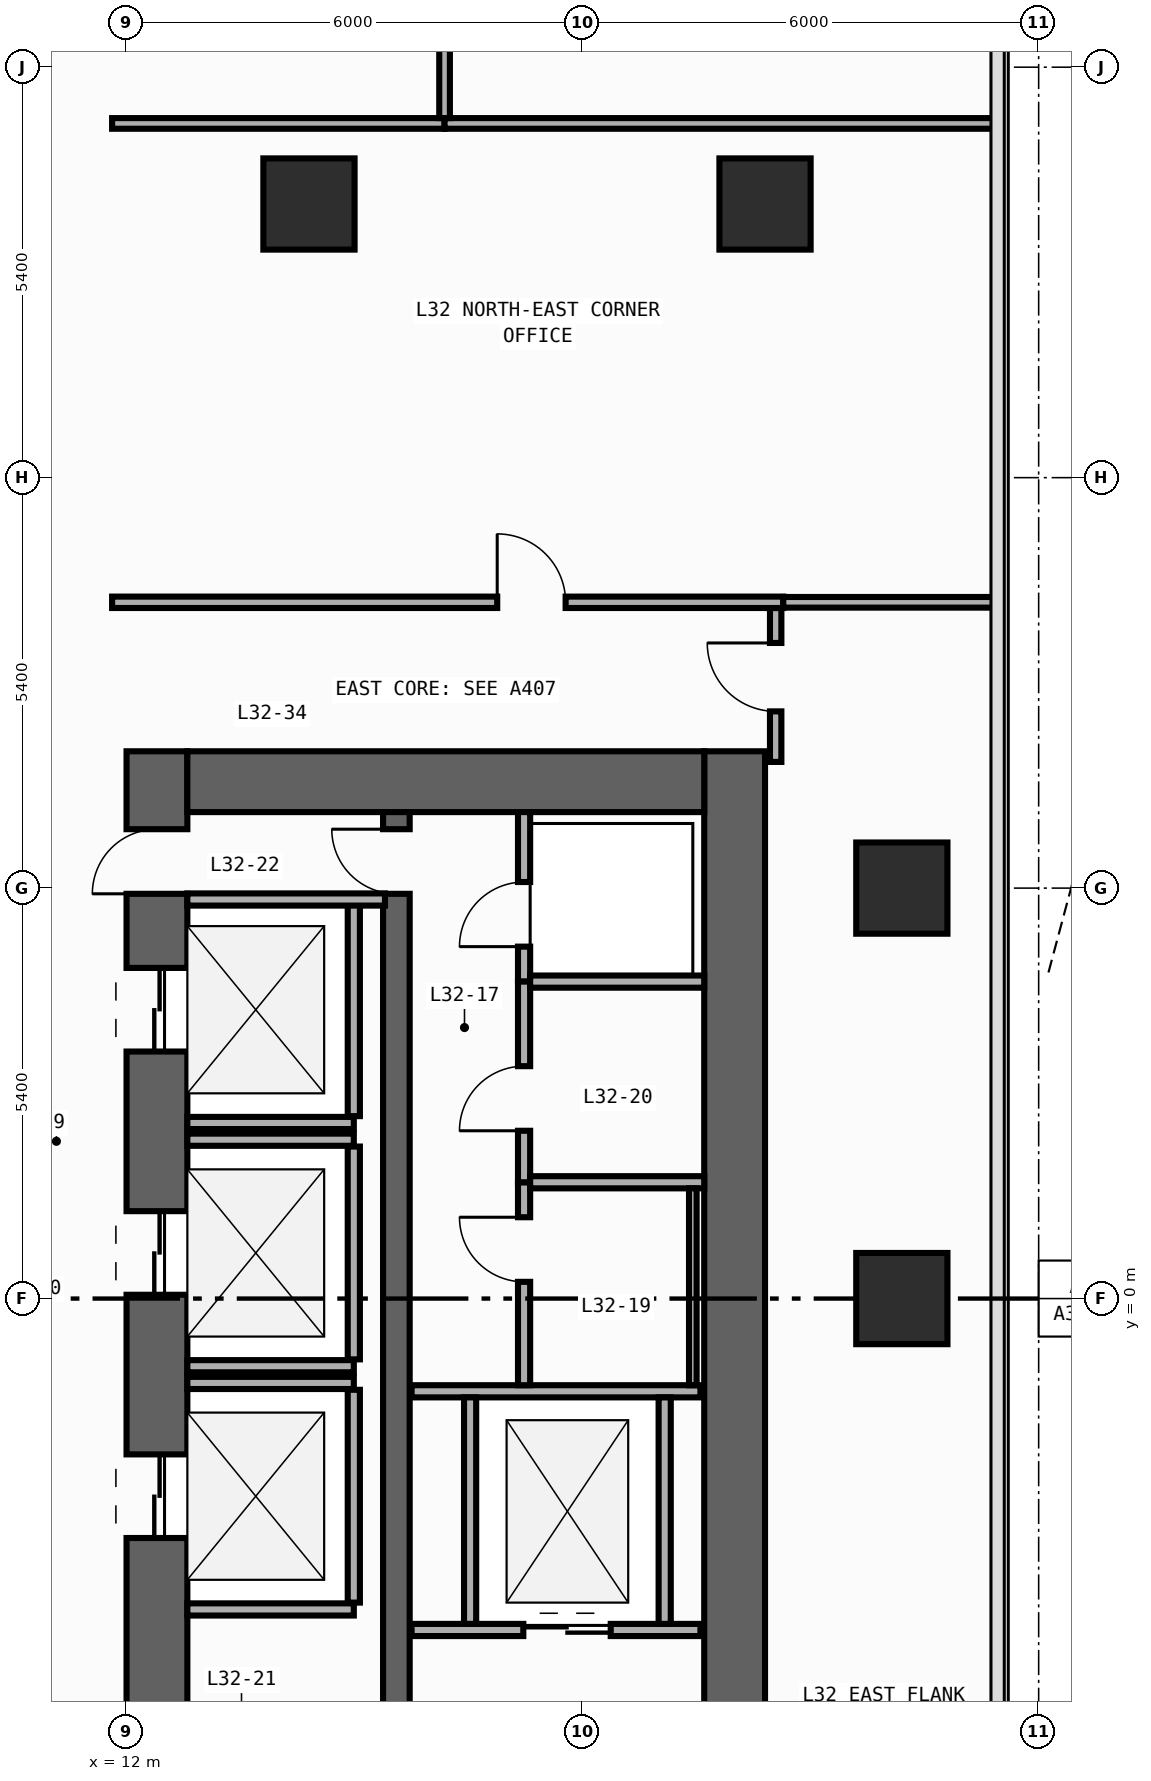
"""IFC4 building model, lengths in metres.
Left out: names, types, materials, properties, quantities, classifications, styles, units other than length and angle.
Written with IfcOpenShell. Run it as: python <this file> out.ifc"""

import sys

from ifc_helpers import new_model, si_unit, direction, frame, frame_2d, origin, origin_2d, place, context, subcontext, project, spatial, rectangle, extrude, element, fill, save


model = new_model("IFC4")
c1 = context("Model", 3, precision=1e-05, world=origin(), true_north=direction((0.0, 1.0)))
c2 = subcontext(c1, "Body", "Model", "MODEL_VIEW")
j1 = project(units=[si_unit("LENGTHUNIT", "METRE"), si_unit("PLANEANGLEUNIT", "RADIAN")], contexts=[c1])
p1 = place(None, origin())
s1 = spatial("IfcSite", under=j1, at=p1, CompositionType="ELEMENT")
p2 = place(p1, origin())
s2 = spatial("IfcBuilding", under=s1, at=p2, CompositionType="ELEMENT")
p3 = place(p2, frame((0.0, 0.0, 139.4)))
s3 = spatial("IfcBuildingStorey", under=s2, at=p3, CompositionType="ELEMENT", Elevation=139.4)
p4 = place(p3, frame((12.4, -19.8, 0.0), z_axis=(0.0, 0.0, 1.0), x_axis=(0.0, 1.0, 0.0)))
e1 = element("IfcWall", 1, at=p4, inside=s3, PredefinedType="SHEAR", context=c2, shape_type="SweptSolid", body=[
    extrude(rectangle(XDim=27.0, YDim=0.8, at=frame_2d((13.5, 0.0))), origin(), (0.0, 0.0, 1.0), 3.94),
])
p5 = place(p4, frame((23.05, 0.0, 0.0)))
e2 = element("IfcOpeningElement", 2, at=p5, cuts=e1, PredefinedType="OPENING", context=c2, shape_type="SweptSolid", body=[
    extrude(rectangle(XDim=1.1, YDim=2.2, at=frame_2d((0.55, 1.1))), frame((0.0, 0.41, 0.0), z_axis=(0.0, -1.0, 0.0), x_axis=(1.0, 0.0, 0.0)), (0.0, 0.0, 1.0), 0.82),
])
p6 = place(p4, frame((19.85, 0.0, 0.0)))
e3 = element("IfcOpeningElement", 3, at=p6, cuts=e1, PredefinedType="OPENING", context=c2, shape_type="SweptSolid", body=[
    extrude(rectangle(XDim=1.1, YDim=2.2, at=frame_2d((0.55, 1.1))), frame((0.0, 0.41, 0.0), z_axis=(0.0, -1.0, 0.0), x_axis=(1.0, 0.0, 0.0)), (0.0, 0.0, 1.0), 0.82),
])
p7 = place(p4, frame((16.65, 0.0, 0.0)))
e4 = element("IfcOpeningElement", 4, at=p7, cuts=e1, PredefinedType="OPENING", context=c2, shape_type="SweptSolid", body=[
    extrude(rectangle(XDim=1.1, YDim=2.2, at=frame_2d((0.55, 1.1))), frame((0.0, 0.41, 0.0), z_axis=(0.0, -1.0, 0.0), x_axis=(1.0, 0.0, 0.0)), (0.0, 0.0, 1.0), 0.82),
])
p8 = place(p4, frame((7.175, 0.0, 0.0)))
e5 = element("IfcOpeningElement", 5, at=p8, cuts=e1, PredefinedType="OPENING", context=c2, shape_type="SweptSolid", body=[
    extrude(rectangle(XDim=0.85, YDim=2.1, at=frame_2d((0.425, 1.05))), frame((0.0, 0.41, 0.0), z_axis=(0.0, -1.0, 0.0), x_axis=(1.0, 0.0, 0.0)), (0.0, 0.0, 1.0), 0.82),
])
p9 = place(p4, frame((10.375, 0.0, 0.0)))
e6 = element("IfcOpeningElement", 6, at=p9, cuts=e1, PredefinedType="OPENING", context=c2, shape_type="SweptSolid", body=[
    extrude(rectangle(XDim=0.85, YDim=2.1, at=frame_2d((0.425, 1.05))), frame((0.0, 0.41, 0.0), z_axis=(0.0, -1.0, 0.0), x_axis=(1.0, 0.0, 0.0)), (0.0, 0.0, 1.0), 0.82),
])
p10 = place(p4, frame((12.725, 0.0, 0.0)))
e7 = element("IfcOpeningElement", 7, at=p10, cuts=e1, PredefinedType="OPENING", context=c2, shape_type="SweptSolid", body=[
    extrude(rectangle(XDim=1.15, YDim=2.2, at=frame_2d((0.575, 1.1))), frame((0.0, 0.41, 0.0), z_axis=(0.0, -1.0, 0.0), x_axis=(1.0, 0.0, 0.0)), (0.0, 0.0, 1.0), 0.82),
])
p11 = place(p4, frame((25.125, 0.0, 0.0)))
e8 = element("IfcOpeningElement", 8, at=p11, cuts=e1, PredefinedType="OPENING", context=c2, shape_type="SweptSolid", body=[
    extrude(rectangle(XDim=0.85, YDim=2.1, at=frame_2d((0.425, 1.05))), frame((0.0, 0.41, 0.0), z_axis=(0.0, -1.0, 0.0), x_axis=(1.0, 0.0, 0.0)), (0.0, 0.0, 1.0), 0.82),
])
p12 = place(p3, frame((20.0, -19.8, 0.0), z_axis=(0.0, 0.0, 1.0), x_axis=(0.0, 1.0, 0.0)))
e9 = element("IfcWall", 9, at=p12, inside=s3, PredefinedType="SHEAR", context=c2, shape_type="SweptSolid", body=[
    extrude(rectangle(XDim=27.0, YDim=0.8, at=frame_2d((13.5, 0.0))), origin(), (0.0, 0.0, 1.0), 3.94),
])
p13 = place(p3, frame((12.8, 6.8, 0.0), z_axis=(0.0, 0.0, 1.0), x_axis=(1.0, 0.0, 0.0)))
e10 = element("IfcWall", 10, at=p13, inside=s3, PredefinedType="SHEAR", context=c2, shape_type="SweptSolid", body=[
    extrude(rectangle(XDim=6.8, YDim=0.8, at=frame_2d((3.4, 0.0))), origin(), (0.0, 0.0, 1.0), 3.94),
])
p14 = place(p3, frame((15.55, -19.0, 0.0), z_axis=(0.0, 0.0, 1.0), x_axis=(0.0, 1.0, 0.0)))
e11 = element("IfcWall", 11, at=p14, inside=s3, PredefinedType="SHEAR", context=c2, shape_type="SweptSolid", body=[
    extrude(rectangle(XDim=25.4, YDim=0.35, at=frame_2d((12.7, 0.0))), origin(), (0.0, 0.0, 1.0), 3.94),
])
p15 = place(p14, frame((11.925, 0.0, 0.0)))
e12 = element("IfcOpeningElement", 12, at=p15, cuts=e11, PredefinedType="OPENING", context=c2, shape_type="SweptSolid", body=[
    extrude(rectangle(XDim=1.15, YDim=2.2, at=frame_2d((0.575, 1.1))), frame((0.0, 0.185, 0.0), z_axis=(0.0, -1.0, 0.0), x_axis=(1.0, 0.0, 0.0)), (0.0, 0.0, 1.0), 0.37),
])
p16 = place(p14, frame((24.325, 0.0, 0.0)))
e13 = element("IfcOpeningElement", 13, at=p16, cuts=e11, PredefinedType="OPENING", context=c2, shape_type="SweptSolid", body=[
    extrude(rectangle(XDim=0.85, YDim=2.1, at=frame_2d((0.425, 1.05))), frame((0.0, 0.185, 0.0), z_axis=(0.0, -1.0, 0.0), x_axis=(1.0, 0.0, 0.0)), (0.0, 0.0, 1.0), 0.37),
])
for number, where, z_axis, x_axis in (
    (14, (20.4, 14.4, 0.0), (0.0, 0.0, 1.0), (1.0, 0.0, 0.0)),
    (15, (14.4, 14.4, 0.0), (0.0, 0.0, 1.0), (1.0, 0.0, 0.0)),
    (16, (22.2, 0.0, 0.0), (0.0, 0.0, 1.0), (1.0, 0.0, 0.0)),
    (17, (22.2, 5.4, 0.0), (0.0, 0.0, 1.0), (1.0, 0.0, 0.0)),
):
    element("IfcColumn", number, at=place(p3, frame(where, z_axis=z_axis, x_axis=x_axis)), inside=s3, PredefinedType="COLUMN", context=c2, shape_type="SweptSolid", body=[
        extrude(rectangle(XDim=1.2, YDim=1.2, at=origin_2d()), origin(), (0.0, 0.0, 1.0), 4.2),
    ])
p17 = place(p3, frame((12.8, 2.31, 0.0), z_axis=(0.0, 0.0, 1.0), x_axis=(1.0, 0.0, 0.0)))
e18 = element("IfcWall", 18, at=p17, inside=s3, PredefinedType="STANDARD", context=c2, shape_type="SweptSolid", body=[
    extrude(rectangle(XDim=2.19, YDim=0.16, at=frame_2d((1.095, 0.0))), origin(), (0.0, 0.0, 1.0), 3.94),
])
p18 = place(p3, frame((14.99, 2.4, 0.0), z_axis=(0.0, 0.0, 1.0), x_axis=(0.0, 1.0, 0.0)))
e19 = element("IfcWall", 19, at=p18, inside=s3, PredefinedType="STANDARD", context=c2, shape_type="SweptSolid", body=[
    extrude(rectangle(XDim=2.8, YDim=0.16, at=frame_2d((1.4, 0.0))), origin(), (0.0, 0.0, 1.0), 3.94),
])
for number, where, z_axis, x_axis in (
    (20, (12.8, -0.89, 0.0), (0.0, 0.0, 1.0), (1.0, 0.0, 0.0)),
    (21, (12.8, 2.09, 0.0), (0.0, 0.0, 1.0), (1.0, 0.0, 0.0)),
):
    element("IfcWall", number, at=place(p3, frame(where, z_axis=z_axis, x_axis=x_axis)), inside=s3, PredefinedType="STANDARD", context=c2, shape_type="SweptSolid", body=[
        extrude(rectangle(XDim=2.19, YDim=0.16, at=frame_2d((1.095, 0.0))), origin(), (0.0, 0.0, 1.0), 3.94),
    ])
p19 = place(p3, frame((14.99, -0.8, 0.0), z_axis=(0.0, 0.0, 1.0), x_axis=(0.0, 1.0, 0.0)))
e22 = element("IfcWall", 22, at=p19, inside=s3, PredefinedType="STANDARD", context=c2, shape_type="SweptSolid", body=[
    extrude(rectangle(XDim=2.8, YDim=0.16, at=frame_2d((1.4, 0.0))), origin(), (0.0, 0.0, 1.0), 3.94),
])
for number, where, z_axis, x_axis in (
    (23, (12.8, -4.09, 0.0), (0.0, 0.0, 1.0), (1.0, 0.0, 0.0)),
    (24, (12.8, -1.11, 0.0), (0.0, 0.0, 1.0), (1.0, 0.0, 0.0)),
):
    element("IfcWall", number, at=place(p3, frame(where, z_axis=z_axis, x_axis=x_axis)), inside=s3, PredefinedType="STANDARD", context=c2, shape_type="SweptSolid", body=[
        extrude(rectangle(XDim=2.19, YDim=0.16, at=frame_2d((1.095, 0.0))), origin(), (0.0, 0.0, 1.0), 3.94),
    ])
p20 = place(p3, frame((14.99, -4.0, 0.0), z_axis=(0.0, 0.0, 1.0), x_axis=(0.0, 1.0, 0.0)))
e25 = element("IfcWall", 25, at=p20, inside=s3, PredefinedType="STANDARD", context=c2, shape_type="SweptSolid", body=[
    extrude(rectangle(XDim=2.8, YDim=0.16, at=frame_2d((1.4, 0.0))), origin(), (0.0, 0.0, 1.0), 3.94),
])
p21 = place(p3, frame((15.75, -4.36, 0.0), z_axis=(0.0, 0.0, 1.0), x_axis=(1.0, 0.0, 0.0)))
e26 = element("IfcWall", 26, at=p21, inside=s3, PredefinedType="STANDARD", context=c2, shape_type="SweptSolid", body=[
    extrude(rectangle(XDim=3.8, YDim=0.16, at=frame_2d((1.9, 0.0))), origin(), (0.0, 0.0, 1.0), 3.94),
])
p22 = place(p21, frame((1.47, 0.0, 0.0)))
e27 = element("IfcOpeningElement", 27, at=p22, cuts=e26, PredefinedType="OPENING", context=c2, shape_type="SweptSolid", body=[
    extrude(rectangle(XDim=1.15, YDim=2.2, at=frame_2d((0.575, 1.1))), frame((0.0, 0.09, 0.0), z_axis=(0.0, -1.0, 0.0), x_axis=(1.0, 0.0, 0.0)), (0.0, 0.0, 1.0), 0.18),
])
p23 = place(p3, frame((15.75, -1.22, 0.0), z_axis=(0.0, 0.0, 1.0), x_axis=(1.0, 0.0, 0.0)))
e28 = element("IfcWall", 28, at=p23, inside=s3, PredefinedType="STANDARD", context=c2, shape_type="SweptSolid", body=[
    extrude(rectangle(XDim=3.8, YDim=0.16, at=frame_2d((1.9, 0.0))), origin(), (0.0, 0.0, 1.0), 3.94),
])
for number, where, z_axis, x_axis in (
    (29, (16.52, -4.28, 0.0), (0.0, 0.0, 1.0), (0.0, 1.0, 0.0)),
    (30, (19.08, -4.28, 0.0), (0.0, 0.0, 1.0), (0.0, 1.0, 0.0)),
):
    element("IfcWall", number, at=place(p3, frame(where, z_axis=z_axis, x_axis=x_axis)), inside=s3, PredefinedType="STANDARD", context=c2, shape_type="SweptSolid", body=[
        extrude(rectangle(XDim=2.98, YDim=0.16, at=frame_2d((1.49, 0.0))), origin(), (0.0, 0.0, 1.0), 3.94),
    ])
p24 = place(p3, frame((12.8, 5.25, 0.0), z_axis=(0.0, 0.0, 1.0), x_axis=(1.0, 0.0, 0.0)))
e31 = element("IfcWall", 31, at=p24, inside=s3, PredefinedType="STANDARD", context=c2, shape_type="SweptSolid", body=[
    extrude(rectangle(XDim=2.6, YDim=0.16, at=frame_2d((1.3, 0.0))), origin(), (0.0, 0.0, 1.0), 3.94),
])
p25 = place(p3, frame((17.23, 4.17, 0.0), z_axis=(0.0, 0.0, 1.0), x_axis=(0.0, 1.0, 0.0)))
e32 = element("IfcWall", 32, at=p25, inside=s3, PredefinedType="PARTITIONING", context=c2, shape_type="SweptSolid", body=[
    extrude(rectangle(XDim=2.23, YDim=0.16, at=frame_2d((1.115, 0.0))), origin(), (0.0, 0.0, 1.0), 3.94),
])
p26 = place(p25, frame((0.46, 0.0, 0.0)))
e33 = element("IfcOpeningElement", 33, at=p26, cuts=e32, PredefinedType="OPENING", context=c2, shape_type="SweptSolid", body=[
    extrude(rectangle(XDim=0.85, YDim=2.1, at=frame_2d((0.425, 1.05))), frame((0.0, 0.09, 0.0), z_axis=(0.0, -1.0, 0.0), x_axis=(1.0, 0.0, 0.0)), (0.0, 0.0, 1.0), 0.18),
])
p27 = place(p3, frame((17.23, -1.14, 0.0), z_axis=(0.0, 0.0, 1.0), x_axis=(0.0, 1.0, 0.0)))
e34 = element("IfcWall", 34, at=p27, inside=s3, PredefinedType="PARTITIONING", context=c2, shape_type="SweptSolid", body=[
    extrude(rectangle(XDim=2.67, YDim=0.16, at=frame_2d((1.335, 0.0))), origin(), (0.0, 0.0, 1.0), 3.94),
])
p28 = place(p27, frame((1.36, 0.0, 0.0)))
e35 = element("IfcOpeningElement", 35, at=p28, cuts=e34, PredefinedType="OPENING", context=c2, shape_type="SweptSolid", body=[
    extrude(rectangle(XDim=0.85, YDim=2.1, at=frame_2d((0.425, 1.05))), frame((0.0, 0.09, 0.0), z_axis=(0.0, -1.0, 0.0), x_axis=(1.0, 0.0, 0.0)), (0.0, 0.0, 1.0), 0.18),
])
p29 = place(p3, frame((17.23, 1.53, 0.0), z_axis=(0.0, 0.0, 1.0), x_axis=(0.0, 1.0, 0.0)))
e36 = element("IfcWall", 36, at=p29, inside=s3, PredefinedType="PARTITIONING", context=c2, shape_type="SweptSolid", body=[
    extrude(rectangle(XDim=2.64, YDim=0.16, at=frame_2d((1.32, 0.0))), origin(), (0.0, 0.0, 1.0), 3.94),
])
p30 = place(p29, frame((0.677, 0.0, 0.0)))
e37 = element("IfcOpeningElement", 37, at=p30, cuts=e36, PredefinedType="OPENING", context=c2, shape_type="SweptSolid", body=[
    extrude(rectangle(XDim=0.85, YDim=2.1, at=frame_2d((0.425, 1.05))), frame((0.0, 0.09, 0.0), z_axis=(0.0, -1.0, 0.0), x_axis=(1.0, 0.0, 0.0)), (0.0, 0.0, 1.0), 0.18),
])
for number, where, z_axis, x_axis in (
    (38, (17.31, 4.17, 0.0), (0.0, 0.0, 1.0), (1.0, 0.0, 0.0)),
    (39, (17.31, 1.53, 0.0), (0.0, 0.0, 1.0), (1.0, 0.0, 0.0)),
):
    element("IfcWall", number, at=place(p3, frame(where, z_axis=z_axis, x_axis=x_axis)), inside=s3, PredefinedType="PARTITIONING", context=c2, shape_type="SweptSolid", body=[
        extrude(rectangle(XDim=2.29, YDim=0.16, at=frame_2d((1.145, 0.0))), origin(), (0.0, 0.0, 1.0), 3.94),
    ])
p31 = place(p3, frame((20.54, 7.06, 0.0), z_axis=(0.0, 0.0, 1.0), x_axis=(0.0, 1.0, 0.0)))
e40 = element("IfcWall", 40, at=p31, inside=s3, PredefinedType="PARTITIONING", context=c2, shape_type="SweptSolid", body=[
    extrude(rectangle(XDim=2.025, YDim=0.15, at=frame_2d((1.012, 0.0))), origin(), (0.0, 0.0, 1.0), 3.94),
])
p32 = place(p31, frame((0.665, 0.0, 0.0)))
e41 = element("IfcOpeningElement", 41, at=p32, cuts=e40, PredefinedType="OPENING", context=c2, shape_type="SweptSolid", body=[
    extrude(rectangle(XDim=0.9, YDim=2.15, at=frame_2d((0.45, 1.075))), frame((0.0, 0.085, 0.0), z_axis=(0.0, -1.0, 0.0), x_axis=(1.0, 0.0, 0.0)), (0.0, 0.0, 1.0), 0.17),
])
p33 = place(p3, frame((11.81, 9.16, 0.0), z_axis=(0.0, 0.0, 1.0), x_axis=(1.0, 0.0, 0.0)))
e42 = element("IfcWall", 42, at=p33, inside=s3, PredefinedType="PARTITIONING", context=c2, shape_type="SweptSolid", body=[
    extrude(rectangle(XDim=8.83, YDim=0.15, at=frame_2d((4.415, 0.0))), origin(), (0.0, 0.0, 1.0), 3.94),
])
p34 = place(p33, frame((5.067, 0.0, 0.0)))
e43 = element("IfcOpeningElement", 43, at=p34, cuts=e42, PredefinedType="OPENING", context=c2, shape_type="SweptSolid", body=[
    extrude(rectangle(XDim=0.9, YDim=2.15, at=frame_2d((0.45, 1.075))), frame((0.0, 0.085, 0.0), z_axis=(0.0, -1.0, 0.0), x_axis=(1.0, 0.0, 0.0)), (0.0, 0.0, 1.0), 0.17),
])
p35 = place(p3, frame((20.64, 9.16, 0.0), z_axis=(0.0, 0.0, 1.0), x_axis=(1.0, 0.0, 0.0)))
e44 = element("IfcWall", 44, at=p35, inside=s3, PredefinedType="PARTITIONING", context=c2, shape_type="SweptSolid", body=[
    extrude(rectangle(XDim=2.815, YDim=0.14, at=frame_2d((1.408, 0.0))), origin(), (0.0, 0.0, 1.0), 3.94),
])
p36 = place(p3, frame((11.81, 15.46, 0.0), z_axis=(0.0, 0.0, 1.0), x_axis=(1.0, 0.0, 0.0)))
e45 = element("IfcWall", 45, at=p36, inside=s3, PredefinedType="PARTITIONING", context=c2, shape_type="SweptSolid", body=[
    extrude(rectangle(XDim=4.374, YDim=0.14, at=frame_2d((2.187, 0.0))), origin(), (0.0, 0.0, 1.0), 3.94),
])
p37 = place(p3, frame((16.184, 15.46, 0.0), z_axis=(0.0, 0.0, 1.0), x_axis=(1.0, 0.0, 0.0)))
e46 = element("IfcWall", 46, at=p37, inside=s3, PredefinedType="PARTITIONING", context=c2, shape_type="SweptSolid", body=[
    extrude(rectangle(XDim=7.271, YDim=0.14, at=frame_2d((3.635, 0.0))), origin(), (0.0, 0.0, 1.0), 3.94),
])
p38 = place(p3, frame((16.184, 15.53, 0.0), z_axis=(0.0, 0.0, 1.0), x_axis=(0.0, 1.0, 0.0)))
e47 = element("IfcWall", 47, at=p38, inside=s3, PredefinedType="PARTITIONING", context=c2, shape_type="SweptSolid", body=[
    extrude(rectangle(XDim=10.625, YDim=0.14, at=frame_2d((5.312, 0.0))), origin(), (0.0, 0.0, 1.0), 3.94),
])
p39 = place(p38, frame((3.68, 0.0, 0.0)))
e48 = element("IfcOpeningElement", 48, at=p39, cuts=e47, PredefinedType="OPENING", context=c2, shape_type="SweptSolid", body=[
    extrude(rectangle(XDim=0.85, YDim=2.1, at=frame_2d((0.425, 1.05))), frame((0.0, 0.08, 0.0), z_axis=(0.0, -1.0, 0.0), x_axis=(1.0, 0.0, 0.0)), (0.0, 0.0, 1.0), 0.16),
])
p40 = place(p3, frame((19.45, 1.45, 0.0), z_axis=(0.0, 0.0, 1.0), x_axis=(0.0, -1.0, 0.0)))
e49 = element("IfcWall", 49, at=p40, inside=s3, PredefinedType="PARTITIONING", context=c2, shape_type="SweptSolid", body=[
    extrude(rectangle(XDim=2.59, YDim=0.1, at=frame_2d((1.295, 0.0))), origin(), (0.0, 0.0, 1.0), 3.94),
])
p41 = place(p5, origin())
e50 = element("IfcDoor", 50, at=p41, inside=s3, OperationType="DOUBLE_DOOR_SLIDING", PredefinedType="DOOR", context=c2, shape_type="SweptSolid", body=[
    extrude(rectangle(XDim=1.1, YDim=2.2, at=frame_2d((0.55, 1.1))), frame((0.0, 0.025, 0.0), z_axis=(0.0, -1.0, 0.0), x_axis=(1.0, 0.0, 0.0)), (0.0, 0.0, 1.0), 0.05),
])
fill(e2, e50)
p42 = place(p6, origin())
e51 = element("IfcDoor", 51, at=p42, inside=s3, OperationType="DOUBLE_DOOR_SLIDING", PredefinedType="DOOR", context=c2, shape_type="SweptSolid", body=[
    extrude(rectangle(XDim=1.1, YDim=2.2, at=frame_2d((0.55, 1.1))), frame((0.0, 0.025, 0.0), z_axis=(0.0, -1.0, 0.0), x_axis=(1.0, 0.0, 0.0)), (0.0, 0.0, 1.0), 0.05),
])
fill(e3, e51)
p43 = place(p7, origin())
e52 = element("IfcDoor", 52, at=p43, inside=s3, OperationType="DOUBLE_DOOR_SLIDING", PredefinedType="DOOR", context=c2, shape_type="SweptSolid", body=[
    extrude(rectangle(XDim=1.1, YDim=2.2, at=frame_2d((0.55, 1.1))), frame((0.0, 0.025, 0.0), z_axis=(0.0, -1.0, 0.0), x_axis=(1.0, 0.0, 0.0)), (0.0, 0.0, 1.0), 0.05),
])
fill(e4, e52)
p44 = place(p11, origin())
e53 = element("IfcDoor", 53, at=p44, inside=s3, OperationType="SINGLE_SWING_LEFT", PredefinedType="DOOR", context=c2, shape_type="SweptSolid", body=[
    extrude(rectangle(XDim=0.85, YDim=2.1, at=frame_2d((0.425, 1.05))), frame((0.0, 0.025, 0.0), z_axis=(0.0, -1.0, 0.0), x_axis=(1.0, 0.0, 0.0)), (0.0, 0.0, 1.0), 0.05),
])
fill(e8, e53)
p45 = place(p16, origin())
e54 = element("IfcDoor", 54, at=p45, inside=s3, OperationType="SINGLE_SWING_RIGHT", PredefinedType="DOOR", context=c2, shape_type="SweptSolid", body=[
    extrude(rectangle(XDim=0.85, YDim=2.1, at=frame_2d((0.425, 1.05))), frame((0.0, 0.025, 0.0), z_axis=(0.0, -1.0, 0.0), x_axis=(1.0, 0.0, 0.0)), (0.0, 0.0, 1.0), 0.05),
])
fill(e13, e54)
p46 = place(p22, origin())
e55 = element("IfcDoor", 55, at=p46, inside=s3, OperationType="DOUBLE_DOOR_SLIDING", PredefinedType="DOOR", context=c2, shape_type="SweptSolid", body=[
    extrude(rectangle(XDim=1.15, YDim=2.2, at=frame_2d((0.575, 1.1))), frame((0.0, 0.025, 0.0), z_axis=(0.0, -1.0, 0.0), x_axis=(1.0, 0.0, 0.0)), (0.0, 0.0, 1.0), 0.05),
])
fill(e27, e55)
p47 = place(p26, origin())
e56 = element("IfcDoor", 56, at=p47, inside=s3, OperationType="SINGLE_SWING_LEFT", PredefinedType="DOOR", context=c2, shape_type="SweptSolid", body=[
    extrude(rectangle(XDim=0.85, YDim=2.1, at=frame_2d((0.425, 1.05))), frame((0.0, 0.025, 0.0), z_axis=(0.0, -1.0, 0.0), x_axis=(1.0, 0.0, 0.0)), (0.0, 0.0, 1.0), 0.05),
])
fill(e33, e56)
p48 = place(p28, origin())
e57 = element("IfcDoor", 57, at=p48, inside=s3, OperationType="SINGLE_SWING_RIGHT", PredefinedType="DOOR", context=c2, shape_type="SweptSolid", body=[
    extrude(rectangle(XDim=0.85, YDim=2.1, at=frame_2d((0.425, 1.05))), frame((0.0, 0.025, 0.0), z_axis=(0.0, -1.0, 0.0), x_axis=(1.0, 0.0, 0.0)), (0.0, 0.0, 1.0), 0.05),
])
fill(e35, e57)
p49 = place(p30, origin())
e58 = element("IfcDoor", 58, at=p49, inside=s3, OperationType="SINGLE_SWING_LEFT", PredefinedType="DOOR", context=c2, shape_type="SweptSolid", body=[
    extrude(rectangle(XDim=0.85, YDim=2.1, at=frame_2d((0.425, 1.05))), frame((0.0, 0.025, 0.0), z_axis=(0.0, -1.0, 0.0), x_axis=(1.0, 0.0, 0.0)), (0.0, 0.0, 1.0), 0.05),
])
fill(e37, e58)
p50 = place(p32, origin())
e59 = element("IfcDoor", 59, at=p50, inside=s3, OperationType="SINGLE_SWING_RIGHT", PredefinedType="DOOR", context=c2, shape_type="SweptSolid", body=[
    extrude(rectangle(XDim=0.9, YDim=2.15, at=frame_2d((0.45, 1.075))), frame((0.0, 0.025, 0.0), z_axis=(0.0, -1.0, 0.0), x_axis=(1.0, 0.0, 0.0)), (0.0, 0.0, 1.0), 0.05),
])
fill(e41, e59)
p51 = place(p34, origin())
e60 = element("IfcDoor", 60, at=p51, inside=s3, OperationType="SINGLE_SWING_LEFT", PredefinedType="DOOR", context=c2, shape_type="SweptSolid", body=[
    extrude(rectangle(XDim=0.9, YDim=2.15, at=frame_2d((0.45, 1.075))), frame((0.0, 0.025, 0.0), z_axis=(0.0, -1.0, 0.0), x_axis=(1.0, 0.0, 0.0)), (0.0, 0.0, 1.0), 0.05),
])
fill(e43, e60)
save(model, sys.argv[1])
